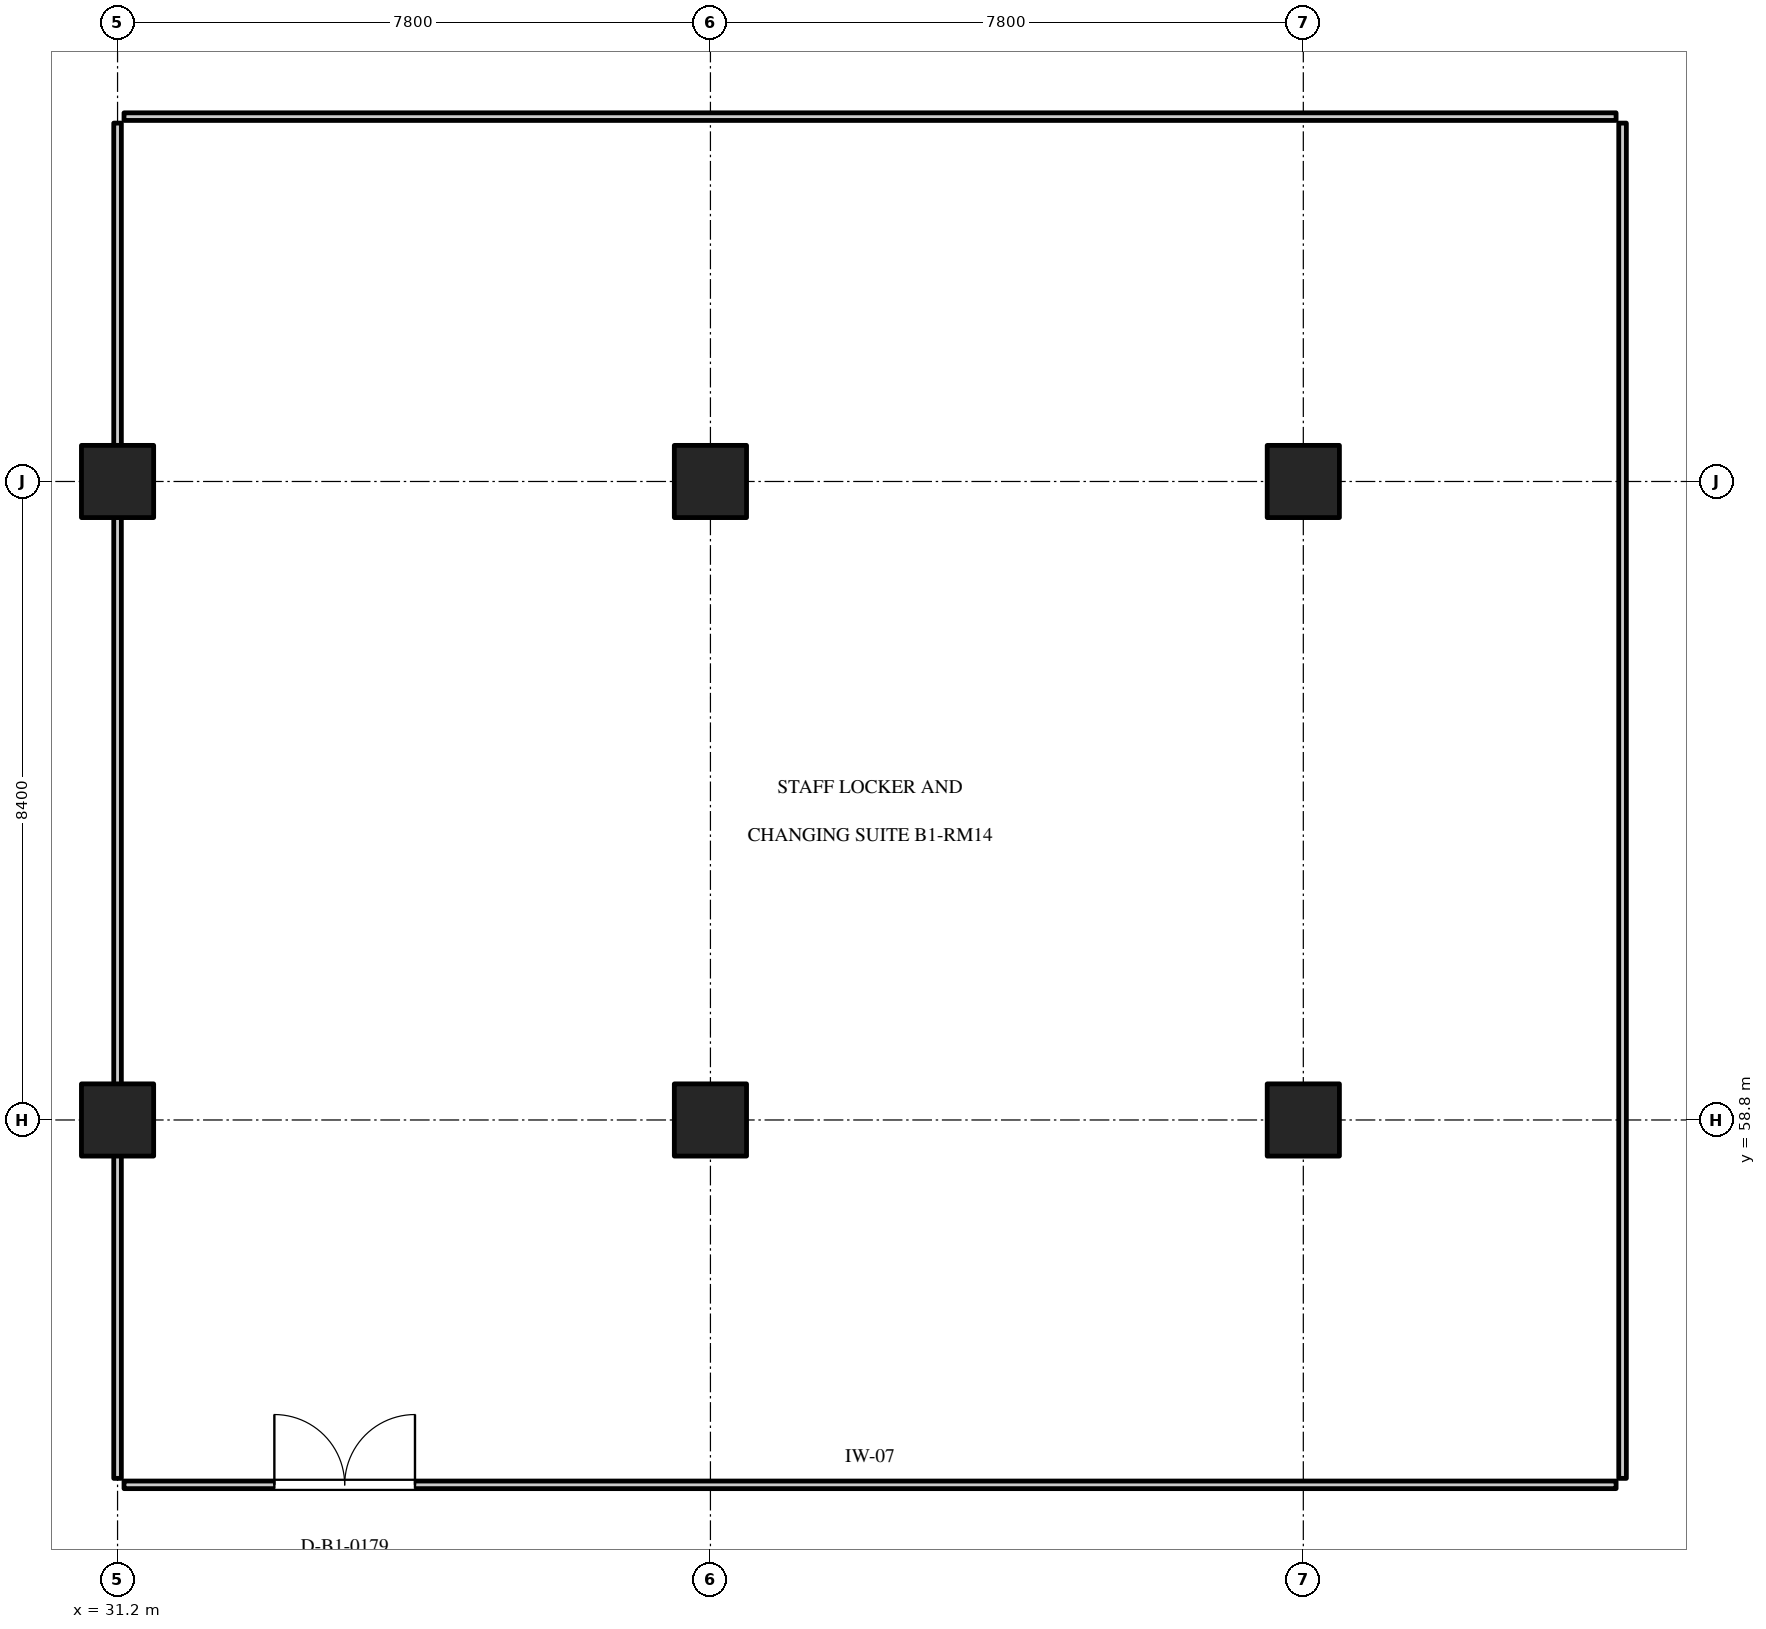
"""IFC4 building model, lengths in metres.
Left out: names, types, materials, properties, quantities, classifications, styles, units other than length and angle.
Written with IfcOpenShell. Run it as: python <this file> out.ifc"""

import sys

from ifc_helpers import new_model, si_unit, direction, frame, frame_2d, origin, origin_2d, place, context, subcontext, project, spatial, rectangle, extrude, element, fill, save


model = new_model("IFC4")
c1 = context("Model", 3, precision=1e-05, world=origin(), true_north=direction((0.0, 1.0)))
c2 = subcontext(c1, "Body", "Model", "MODEL_VIEW")
j1 = project(units=[si_unit("LENGTHUNIT", "METRE"), si_unit("PLANEANGLEUNIT", "RADIAN")], contexts=[c1])
p1 = place(None, origin())
s1 = spatial("IfcSite", under=j1, at=p1, CompositionType="ELEMENT")
p2 = place(p1, origin())
s2 = spatial("IfcBuilding", under=s1, at=p2, CompositionType="ELEMENT")
p3 = place(p2, frame((0.0, 0.0, -4.5)))
s3 = spatial("IfcBuildingStorey", under=s2, at=p3, CompositionType="ELEMENT", Elevation=-4.5)
for number, where, z_axis, x_axis in (
    (1, (31.2, 58.8, 0.0), (0.0, 0.0, 1.0), (1.0, 0.0, 0.0)),
    (2, (31.2, 67.2, 0.0), (0.0, 0.0, 1.0), (1.0, 0.0, 0.0)),
    (3, (39.0, 58.8, 0.0), (0.0, 0.0, 1.0), (1.0, 0.0, 0.0)),
    (4, (39.0, 67.2, 0.0), (0.0, 0.0, 1.0), (1.0, 0.0, 0.0)),
    (5, (46.8, 58.8, 0.0), (0.0, 0.0, 1.0), (1.0, 0.0, 0.0)),
    (6, (46.8, 67.2, 0.0), (0.0, 0.0, 1.0), (1.0, 0.0, 0.0)),
):
    element("IfcColumn", number, at=place(p3, frame(where, z_axis=z_axis, x_axis=x_axis)), inside=s3, PredefinedType="COLUMN", context=c2, shape_type="SweptSolid", body=[
        extrude(rectangle(XDim=0.95, YDim=0.95, at=origin_2d()), origin(), (0.0, 0.0, 1.0), 4.5),
    ])
p4 = place(p3, frame((31.285, 54.0, 0.0), z_axis=(0.0, 0.0, 1.0), x_axis=(1.0, 0.0, 0.0)))
e7 = element("IfcWall", 7, at=p4, inside=s3, PredefinedType="PARTITIONING", context=c2, shape_type="SweptSolid", body=[
    extrude(rectangle(XDim=19.63, YDim=0.1, at=frame_2d((9.815, 0.0))), origin(), (0.0, 0.0, 1.0), 4.13),
])
p5 = place(p4, frame((1.978, 0.0, 0.0)))
e8 = element("IfcOpeningElement", 8, at=p5, cuts=e7, PredefinedType="OPENING", context=c2, shape_type="SweptSolid", body=[
    extrude(rectangle(XDim=1.85, YDim=2.3, at=frame_2d((0.925, 1.15))), frame((0.0, 0.062, 0.0), z_axis=(0.0, -1.0, 0.0), x_axis=(1.0, 0.0, 0.0)), (0.0, 0.0, 1.0), 0.124),
])
p6 = place(p3, frame((31.285, 72.0, 0.0), z_axis=(0.0, 0.0, 1.0), x_axis=(1.0, 0.0, 0.0)))
e9 = element("IfcWall", 9, at=p6, inside=s3, PredefinedType="PARTITIONING", context=c2, shape_type="SweptSolid", body=[
    extrude(rectangle(XDim=19.63, YDim=0.1, at=frame_2d((9.815, 0.0))), origin(), (0.0, 0.0, 1.0), 4.13),
])
for number, where, z_axis, x_axis in (
    (10, (31.2, 54.085, 0.0), (0.0, 0.0, 1.0), (0.0, 1.0, 0.0)),
    (11, (51.0, 54.085, 0.0), (0.0, 0.0, 1.0), (0.0, 1.0, 0.0)),
):
    element("IfcWall", number, at=place(p3, frame(where, z_axis=z_axis, x_axis=x_axis)), inside=s3, PredefinedType="PARTITIONING", context=c2, shape_type="SweptSolid", body=[
        extrude(rectangle(XDim=17.83, YDim=0.1, at=frame_2d((8.915, 0.0))), origin(), (0.0, 0.0, 1.0), 4.13),
    ])
p7 = place(p5, origin())
e12 = element("IfcDoor", 12, at=p7, inside=s3, OperationType="DOUBLE_DOOR_SINGLE_SWING", PredefinedType="DOOR", context=c2, shape_type="SweptSolid", body=[
    extrude(rectangle(XDim=1.85, YDim=2.3, at=frame_2d((0.925, 1.15))), frame((0.0, 0.025, 0.0), z_axis=(0.0, -1.0, 0.0), x_axis=(1.0, 0.0, 0.0)), (0.0, 0.0, 1.0), 0.05),
])
fill(e8, e12)
save(model, sys.argv[1])
